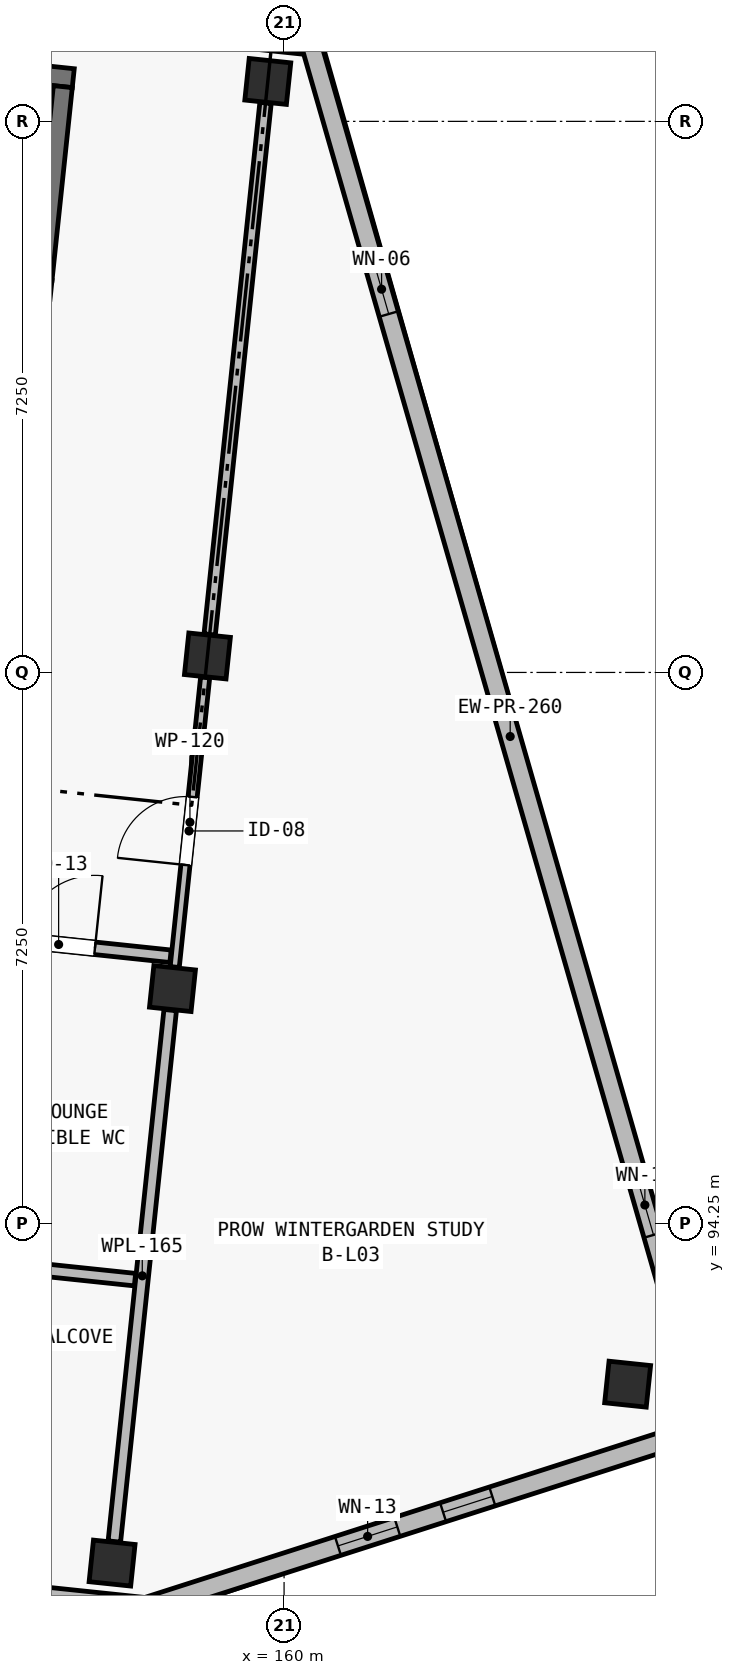
"""IFC4 building model, lengths in metres.
Left out: names, types, materials, properties, quantities, classifications, styles, units other than length and angle.
Written with IfcOpenShell. Run it as: python <this file> out.ifc"""

import sys

from ifc_helpers import new_model, si_unit, direction, frame, frame_2d, origin, origin_2d, place, context, subcontext, project, spatial, rectangle, extrude, element, fill, save


model = new_model("IFC4")
c1 = context("Model", 3, precision=1e-05, world=origin(), true_north=direction((0.0, 1.0)))
c2 = subcontext(c1, "Body", "Model", "MODEL_VIEW")
j1 = project(units=[si_unit("LENGTHUNIT", "METRE"), si_unit("PLANEANGLEUNIT", "RADIAN")], contexts=[c1])
p1 = place(None, origin())
s1 = spatial("IfcSite", under=j1, at=p1, CompositionType="ELEMENT")
p2 = place(p1, origin())
s2 = spatial("IfcBuilding", under=s1, at=p2, CompositionType="ELEMENT")
p3 = place(p2, frame((0.0, 0.0, 11.65)))
s3 = spatial("IfcBuildingStorey", under=s2, at=p3, CompositionType="ELEMENT", Elevation=11.65)
for number, where, z_axis, x_axis in (
    (1, (157.737, 89.783, 0.0), (0.0, 0.0, 1.0), (0.995, -0.105, 0.0)),
    (2, (158.531, 97.341, 0.0), (0.0, 0.0, 1.0), (0.995, -0.105, 0.0)),
    (3, (158.991, 101.717, 0.0), (0.0, 0.0, 1.0), (0.995, -0.105, 0.0)),
    (4, (159.786, 109.275, 0.0), (0.0, 0.0, 1.0), (0.995, -0.105, 0.0)),
    (5, (164.52, 92.136, 0.0), (0.0, 0.0, 1.0), (0.995, -0.105, 0.0)),
):
    element("IfcColumn", number, at=place(p3, frame(where, z_axis=z_axis, x_axis=x_axis)), inside=s3, PredefinedType="COLUMN", context=c2, shape_type="SweptSolid", body=[
        extrude(rectangle(XDim=0.55, YDim=0.55, at=origin_2d()), origin(), (0.0, 0.0, 1.0), 3.25),
    ])
p4 = place(p3, frame((152.204, 109.846, 0.0), z_axis=(0.0, 0.0, 1.0), x_axis=(0.994522922189, -0.104518693261, 0.0)))
e6 = element("IfcWall", 6, at=p4, inside=s3, PredefinedType="SHEAR", context=c2, shape_type="SweptSolid", body=[
    extrude(rectangle(XDim=5.05, YDim=0.25, at=frame_2d((2.525, 0.0))), origin(), (0.0, 0.0, 1.0), 3.25),
])
p5 = place(p3, frame((156.822, 106.671, 0.0), z_axis=(0.0, 0.0, 1.0), x_axis=(0.104545242946, 0.99452013161, 0.0)))
e7 = element("IfcWall", 7, at=p5, inside=s3, PredefinedType="SHEAR", context=c2, shape_type="SweptSolid", body=[
    extrude(rectangle(XDim=2.55, YDim=0.25, at=frame_2d((1.275, 0.0))), origin(), (0.0, 0.0, 1.0), 3.25),
])
p6 = place(p3, frame((158.204, 89.206, 0.0), z_axis=(0.0, 0.0, 1.0), x_axis=(-0.994521760736, 0.104529744196, 0.0)))
e8 = element("IfcWall", 8, at=p6, inside=s3, PredefinedType="SOLIDWALL", context=c2, shape_type="SweptSolid", body=[
    extrude(rectangle(XDim=8.525, YDim=0.24, at=frame_2d((4.262, 0.0))), origin(), (0.0, 0.0, 1.0), 3.0),
])
p7 = place(p6, frame((1.673, 0.0, 0.52)))
e9 = element("IfcOpeningElement", 9, at=p7, cuts=e8, PredefinedType="OPENING", context=c2, shape_type="SweptSolid", body=[
    extrude(rectangle(XDim=0.72, YDim=2.16, at=frame_2d((0.36, 1.08))), frame((0.0, 0.135, 0.0), z_axis=(0.0, -1.0, 0.0), x_axis=(1.0, 0.0, 0.0)), (0.0, 0.0, 1.0), 0.27),
])
p8 = place(p6, frame((3.835, 0.0, 0.52)))
e10 = element("IfcOpeningElement", 10, at=p8, cuts=e8, PredefinedType="OPENING", context=c2, shape_type="SweptSolid", body=[
    extrude(rectangle(XDim=0.78, YDim=2.2, at=frame_2d((0.39, 1.1))), frame((0.0, 0.135, 0.0), z_axis=(0.0, -1.0, 0.0), x_axis=(1.0, 0.0, 0.0)), (0.0, 0.0, 1.0), 0.27),
])
p9 = place(p6, frame((7.115, 0.0, 0.42)))
e11 = element("IfcOpeningElement", 11, at=p9, cuts=e8, PredefinedType="OPENING", context=c2, shape_type="SweptSolid", body=[
    extrude(rectangle(XDim=0.8, YDim=2.3, at=frame_2d((0.4, 1.15))), frame((0.0, 0.135, 0.0), z_axis=(0.0, -1.0, 0.0), x_axis=(1.0, 0.0, 0.0)), (0.0, 0.0, 1.0), 0.27),
])
p10 = place(p3, frame((151.885, 110.634, 0.0), z_axis=(0.0, 0.0, 1.0), x_axis=(0.994521760736, -0.104529744196, 0.0)))
e12 = element("IfcWall", 12, at=p10, inside=s3, PredefinedType="SOLIDWALL", context=c2, shape_type="SweptSolid", body=[
    extrude(rectangle(XDim=8.525, YDim=0.24, at=frame_2d((4.262, 0.0))), origin(), (0.0, 0.0, 1.0), 3.0),
])
p11 = place(p10, frame((6.925, 0.0, 0.45)))
e13 = element("IfcOpeningElement", 13, at=p11, cuts=e12, PredefinedType="OPENING", context=c2, shape_type="SweptSolid", body=[
    extrude(rectangle(XDim=0.75, YDim=2.32, at=frame_2d((0.375, 1.16))), frame((0.0, 0.135, 0.0), z_axis=(0.0, -1.0, 0.0), x_axis=(1.0, 0.0, 0.0)), (0.0, 0.0, 1.0), 0.27),
])
p12 = place(p3, frame((160.363, 109.742, 0.0), z_axis=(0.0, 0.0, 1.0), x_axis=(0.276322184526, -0.961065060409, 0.0)))
e14 = element("IfcWall", 14, at=p12, inside=s3, PredefinedType="SOLIDWALL", context=c2, shape_type="SweptSolid", body=[
    extrude(rectangle(XDim=18.907, YDim=0.26, at=frame_2d((9.453, 0.0))), origin(), (0.0, 0.0, 1.0), 3.0),
])
p13 = place(p12, frame((2.99, 0.0, 0.52)))
e15 = element("IfcOpeningElement", 15, at=p13, cuts=e14, PredefinedType="OPENING", context=c2, shape_type="SweptSolid", body=[
    extrude(rectangle(XDim=0.68, YDim=2.24, at=frame_2d((0.34, 1.12))), frame((0.0, 0.145, 0.0), z_axis=(0.0, -1.0, 0.0), x_axis=(1.0, 0.0, 0.0)), (0.0, 0.0, 1.0), 0.29),
])
p14 = place(p12, frame((15.457, 0.0, 0.45)))
e16 = element("IfcOpeningElement", 16, at=p14, cuts=e14, PredefinedType="OPENING", context=c2, shape_type="SweptSolid", body=[
    extrude(rectangle(XDim=0.82, YDim=2.18, at=frame_2d((0.41, 1.09))), frame((0.0, 0.145, 0.0), z_axis=(0.0, -1.0, 0.0), x_axis=(1.0, 0.0, 0.0)), (0.0, 0.0, 1.0), 0.29),
])
p15 = place(p3, frame((165.587, 91.572, 0.0), z_axis=(0.0, 0.0, 1.0), x_axis=(-0.9522851043, -0.305209895201, 0.0)))
e17 = element("IfcWall", 17, at=p15, inside=s3, PredefinedType="SOLIDWALL", context=c2, shape_type="SweptSolid", body=[
    extrude(rectangle(XDim=7.753, YDim=0.26, at=frame_2d((3.876, 0.0))), origin(), (0.0, 0.0, 1.0), 3.0),
])
p16 = place(p15, frame((2.99, 0.0, 0.52)))
e18 = element("IfcOpeningElement", 18, at=p16, cuts=e17, PredefinedType="OPENING", context=c2, shape_type="SweptSolid", body=[
    extrude(rectangle(XDim=0.68, YDim=2.24, at=frame_2d((0.34, 1.12))), frame((0.0, 0.145, 0.0), z_axis=(0.0, -1.0, 0.0), x_axis=(1.0, 0.0, 0.0)), (0.0, 0.0, 1.0), 0.29),
])
p17 = place(p15, frame((4.303, 0.0, 0.45)))
e19 = element("IfcOpeningElement", 19, at=p17, cuts=e17, PredefinedType="OPENING", context=c2, shape_type="SweptSolid", body=[
    extrude(rectangle(XDim=0.82, YDim=2.18, at=frame_2d((0.41, 1.09))), frame((0.0, 0.145, 0.0), z_axis=(0.0, -1.0, 0.0), x_axis=(1.0, 0.0, 0.0)), (0.0, 0.0, 1.0), 0.29),
])
p18 = place(p3, frame((158.561, 97.625, 0.0), z_axis=(0.0, 0.0, 1.0), x_axis=(0.104545412893, 0.994520113745, 0.0)))
e20 = element("IfcWall", 20, at=p18, inside=s3, PredefinedType="PARTITIONING", context=c2, shape_type="SweptSolid", body=[
    extrude(rectangle(XDim=3.83, YDim=0.12, at=frame_2d((1.915, 0.0))), origin(), (0.0, 0.0, 1.0), 2.5),
])
p19 = place(p18, frame((1.35, 0.0, 0.0)))
e21 = element("IfcOpeningElement", 21, at=p19, cuts=e20, PredefinedType="OPENING", context=c2, shape_type="SweptSolid", body=[
    extrude(rectangle(XDim=0.9, YDim=2.1, at=frame_2d((0.45, 1.05))), frame((0.0, 0.075, 0.0), z_axis=(0.0, -1.0, 0.0), x_axis=(1.0, 0.0, 0.0)), (0.0, 0.0, 1.0), 0.15),
])
p20 = place(p3, frame((159.021, 102.0, 0.0), z_axis=(0.0, 0.0, 1.0), x_axis=(0.10452931889, 0.994521805438, 0.0)))
e22 = element("IfcWall", 22, at=p20, inside=s3, PredefinedType="PARTITIONING", context=c2, shape_type="SweptSolid", body=[
    extrude(rectangle(XDim=7.03, YDim=0.15, at=frame_2d((3.515, 0.0))), origin(), (0.0, 0.0, 1.0), 2.5),
])
p21 = place(p3, frame((157.767, 90.066, 0.0), z_axis=(0.0, 0.0, 1.0), x_axis=(0.104532929154, 0.994521425975, 0.0)))
e23 = element("IfcWall", 23, at=p21, inside=s3, PredefinedType="PLUMBINGWALL", context=c2, shape_type="SweptSolid", body=[
    extrude(rectangle(XDim=7.03, YDim=0.165, at=frame_2d((3.515, 0.0))), origin(), (0.0, 0.0, 1.0), 2.5),
])
p22 = place(p3, frame((155.91, 98.039, 0.0), z_axis=(0.0, 0.0, 1.0), x_axis=(0.994526447543, -0.104485143144, 0.0)))
e24 = element("IfcWall", 24, at=p22, inside=s3, PredefinedType="PLUMBINGWALL", context=c2, shape_type="SweptSolid", body=[
    extrude(rectangle(XDim=2.61, YDim=0.165, at=frame_2d((1.305, 0.0))), origin(), (0.0, 0.0, 1.0), 2.97),
])
p23 = place(p22, frame((0.65, 0.0, 0.0)))
e25 = element("IfcOpeningElement", 25, at=p23, cuts=e24, PredefinedType="OPENING", context=c2, shape_type="SweptSolid", body=[
    extrude(rectangle(XDim=0.96, YDim=2.12, at=frame_2d((0.48, 1.06))), frame((0.0, 0.097, 0.0), z_axis=(0.0, -1.0, 0.0), x_axis=(1.0, 0.0, 0.0)), (0.0, 0.0, 1.0), 0.195),
])
p24 = place(p3, frame((155.463, 93.782, 0.0), z_axis=(0.0, 0.0, 1.0), x_axis=(0.994521452323, -0.104532678478, 0.0)))
e26 = element("IfcWall", 26, at=p24, inside=s3, PredefinedType="PLUMBINGWALL", context=c2, shape_type="SweptSolid", body=[
    extrude(rectangle(XDim=2.59, YDim=0.165, at=frame_2d((1.295, 0.0))), origin(), (0.0, 0.0, 1.0), 2.97),
])
p25 = place(p13, origin())
e27 = element("IfcWindow", 27, at=p25, inside=s3, PartitioningType="SINGLE_PANEL", PredefinedType="WINDOW", context=c2, shape_type="SweptSolid", body=[
    extrude(rectangle(XDim=0.68, YDim=2.24, at=frame_2d((0.34, 1.12))), frame((0.0, 0.03, 0.0), z_axis=(0.0, -1.0, 0.0), x_axis=(1.0, 0.0, 0.0)), (0.0, 0.0, 1.0), 0.06),
])
fill(e15, e27)
p26 = place(p14, origin())
e28 = element("IfcWindow", 28, at=p26, inside=s3, PartitioningType="SINGLE_PANEL", PredefinedType="WINDOW", context=c2, shape_type="SweptSolid", body=[
    extrude(rectangle(XDim=0.82, YDim=2.18, at=frame_2d((0.41, 1.09))), frame((0.0, 0.03, 0.0), z_axis=(0.0, -1.0, 0.0), x_axis=(1.0, 0.0, 0.0)), (0.0, 0.0, 1.0), 0.06),
])
fill(e16, e28)
p27 = place(p16, origin())
e29 = element("IfcWindow", 29, at=p27, inside=s3, PartitioningType="SINGLE_PANEL", PredefinedType="WINDOW", context=c2, shape_type="SweptSolid", body=[
    extrude(rectangle(XDim=0.68, YDim=2.24, at=frame_2d((0.34, 1.12))), frame((0.0, 0.03, 0.0), z_axis=(0.0, -1.0, 0.0), x_axis=(1.0, 0.0, 0.0)), (0.0, 0.0, 1.0), 0.06),
])
fill(e18, e29)
p28 = place(p17, origin())
e30 = element("IfcWindow", 30, at=p28, inside=s3, PartitioningType="SINGLE_PANEL", PredefinedType="WINDOW", context=c2, shape_type="SweptSolid", body=[
    extrude(rectangle(XDim=0.82, YDim=2.18, at=frame_2d((0.41, 1.09))), frame((0.0, 0.03, 0.0), z_axis=(0.0, -1.0, 0.0), x_axis=(1.0, 0.0, 0.0)), (0.0, 0.0, 1.0), 0.06),
])
fill(e19, e30)
p29 = place(p19, origin())
e31 = element("IfcDoor", 31, at=p29, inside=s3, OperationType="SINGLE_SWING_LEFT", PredefinedType="DOOR", context=c2, shape_type="SweptSolid", body=[
    extrude(rectangle(XDim=0.9, YDim=2.1, at=frame_2d((0.45, 1.05))), frame((0.0, 0.025, 0.0), z_axis=(0.0, -1.0, 0.0), x_axis=(1.0, 0.0, 0.0)), (0.0, 0.0, 1.0), 0.05),
])
fill(e21, e31)
p30 = place(p23, origin())
e32 = element("IfcDoor", 32, at=p30, inside=s3, OperationType="SINGLE_SWING_RIGHT", PredefinedType="DOOR", context=c2, shape_type="SweptSolid", body=[
    extrude(rectangle(XDim=0.96, YDim=2.12, at=frame_2d((0.48, 1.06))), frame((0.0, 0.025, 0.0), z_axis=(0.0, -1.0, 0.0), x_axis=(1.0, 0.0, 0.0)), (0.0, 0.0, 1.0), 0.05),
])
fill(e25, e32)
save(model, sys.argv[1])
